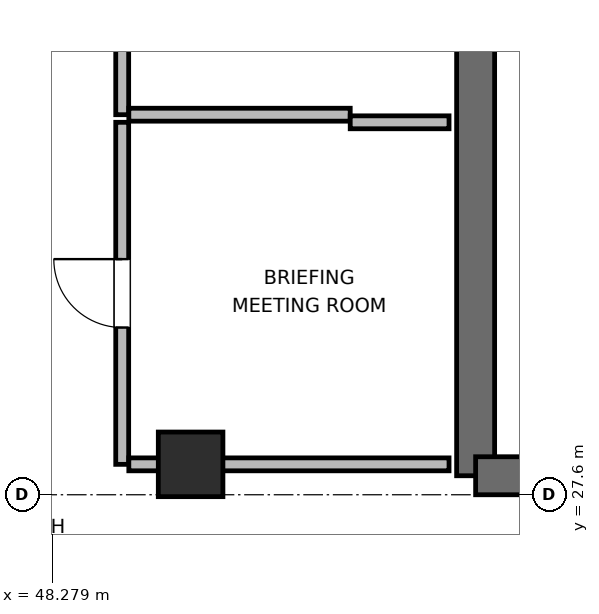
"""IFC4 building model, lengths in metres.
Left out: names, types, materials, properties, quantities, classifications, styles, units other than length and angle.
Written with IfcOpenShell. Run it as: python <this file> out.ifc"""

import sys

from ifc_helpers import new_model, si_unit, direction, frame, frame_2d, origin, origin_2d, place, context, subcontext, project, spatial, rectangle, extrude, element, fill, save


model = new_model("IFC4")
c1 = context("Model", 3, precision=1e-05, world=origin(), true_north=direction((0.0, 1.0)))
c2 = subcontext(c1, "Body", "Model", "MODEL_VIEW")
j1 = project(units=[si_unit("LENGTHUNIT", "METRE"), si_unit("PLANEANGLEUNIT", "RADIAN")], contexts=[c1])
p1 = place(None, origin())
s1 = spatial("IfcSite", under=j1, at=p1, CompositionType="ELEMENT")
p2 = place(p1, origin())
s2 = spatial("IfcBuilding", under=s1, at=p2, CompositionType="ELEMENT")
p3 = place(p2, frame((0.0, 0.0, 342.0)))
s3 = spatial("IfcBuildingStorey", under=s2, at=p3, CompositionType="ELEMENT", Elevation=342.0)
p4 = place(p3, frame((53.85, 27.85, 0.0), z_axis=(0.0, 0.0, 1.0), x_axis=(0.0, 1.0, 0.0)))
e1 = element("IfcWall", 1, at=p4, inside=s3, PredefinedType="SHEAR", context=c2, shape_type="SweptSolid", body=[
    extrude(rectangle(XDim=7.95, YDim=0.5, at=frame_2d((3.975, 0.0))), origin(), (0.0, 0.0, 1.0), 4.5),
])
p5 = place(p3, frame((53.85, 27.85, 0.0), z_axis=(0.0, 0.0, 1.0), x_axis=(1.0, 0.0, 0.0)))
e2 = element("IfcWall", 2, at=p5, inside=s3, PredefinedType="SHEAR", context=c2, shape_type="SweptSolid", body=[
    extrude(rectangle(XDim=9.5, YDim=0.5, at=frame_2d((4.75, 0.0))), origin(), (0.0, 0.0, 1.0), 4.5),
])
p6 = place(p5, frame((4.025, 0.0, 0.0)))
e3 = element("IfcOpeningElement", 3, at=p6, cuts=e2, PredefinedType="OPENING", context=c2, shape_type="SweptSolid", body=[
    extrude(rectangle(XDim=1.05, YDim=2.04, at=frame_2d((0.525, 1.02))), frame((0.0, 0.26, 0.0), z_axis=(0.0, -1.0, 0.0), x_axis=(1.0, 0.0, 0.0)), (0.0, 0.0, 1.0), 0.52),
])
p7 = place(p3, frame((50.1, 28.0, 0.0), z_axis=(0.0, 0.0, 1.0), x_axis=(1.0, 0.0, 0.0)))
e4 = element("IfcColumn", 4, at=p7, inside=s3, PredefinedType="COLUMN", context=c2, shape_type="SweptSolid", body=[
    extrude(rectangle(XDim=0.85, YDim=0.85, at=origin_2d()), origin(), (0.0, 0.0, 1.0), 4.5),
])
p8 = place(p3, frame((49.2, 32.6, 0.0), z_axis=(0.0, 0.0, 1.0), x_axis=(0.0, 1.0, 0.0)))
e5 = element("IfcWall", 5, at=p8, inside=s3, PredefinedType="PARTITIONING", context=c2, shape_type="SweptSolid", body=[
    extrude(rectangle(XDim=3.4, YDim=0.17, at=frame_2d((1.7, 0.0))), origin(), (0.0, 0.0, 1.0), 4.28),
])
p9 = place(p8, frame((1.25, 0.0, 0.0)))
e6 = element("IfcOpeningElement", 6, at=p9, cuts=e5, PredefinedType="OPENING", context=c2, shape_type="SweptSolid", body=[
    extrude(rectangle(XDim=0.9, YDim=2.02, at=frame_2d((0.45, 1.01))), frame((0.0, 0.095, 0.0), z_axis=(0.0, -1.0, 0.0), x_axis=(1.0, 0.0, 0.0)), (0.0, 0.0, 1.0), 0.19),
])
p10 = place(p3, frame((49.287, 32.6, 0.0), z_axis=(0.0, 0.0, 1.0), x_axis=(1.0, 0.0, 0.0)))
e7 = element("IfcWall", 7, at=p10, inside=s3, PredefinedType="PARTITIONING", context=c2, shape_type="SweptSolid", body=[
    extrude(rectangle(XDim=2.913, YDim=0.17, at=frame_2d((1.457, 0.0))), origin(), (0.0, 0.0, 1.0), 4.28),
])
p11 = place(p3, frame((49.2, 28.0, 0.0), z_axis=(0.0, 0.0, 1.0), x_axis=(0.0, 1.0, 0.0)))
e8 = element("IfcWall", 8, at=p11, inside=s3, PredefinedType="PARTITIONING", context=c2, shape_type="SweptSolid", body=[
    extrude(rectangle(XDim=4.5, YDim=0.17, at=frame_2d((2.25, 0.0))), origin(), (0.0, 0.0, 1.0), 4.28),
])
p12 = place(p11, frame((1.8, 0.0, 0.0)))
e9 = element("IfcOpeningElement", 9, at=p12, cuts=e8, PredefinedType="OPENING", context=c2, shape_type="SweptSolid", body=[
    extrude(rectangle(XDim=0.9, YDim=2.02, at=frame_2d((0.45, 1.01))), frame((0.0, 0.095, 0.0), z_axis=(0.0, -1.0, 0.0), x_axis=(1.0, 0.0, 0.0)), (0.0, 0.0, 1.0), 0.19),
])
p13 = place(p3, frame((49.287, 28.0, 0.0), z_axis=(0.0, 0.0, 1.0), x_axis=(1.0, 0.0, 0.0)))
e10 = element("IfcWall", 10, at=p13, inside=s3, PredefinedType="PARTITIONING", context=c2, shape_type="SweptSolid", body=[
    extrude(rectangle(XDim=4.213, YDim=0.17, at=frame_2d((2.106, 0.0))), origin(), (0.0, 0.0, 1.0), 3.365),
])
p14 = place(p3, frame((52.2, 32.5, 0.0), z_axis=(0.0, 0.0, 1.0), x_axis=(1.0, 0.0, 0.0)))
e11 = element("IfcWall", 11, at=p14, inside=s3, PredefinedType="PARTITIONING", context=c2, shape_type="SweptSolid", body=[
    extrude(rectangle(XDim=1.3, YDim=0.17, at=frame_2d((0.65, 0.0))), origin(), (0.0, 0.0, 1.0), 4.28),
])
p15 = place(p12, origin())
e12 = element("IfcDoor", 12, at=p15, inside=s3, OperationType="SINGLE_SWING_RIGHT", PredefinedType="DOOR", context=c2, shape_type="SweptSolid", body=[
    extrude(rectangle(XDim=0.9, YDim=2.02, at=frame_2d((0.45, 1.01))), frame((0.0, 0.025, 0.0), z_axis=(0.0, -1.0, 0.0), x_axis=(1.0, 0.0, 0.0)), (0.0, 0.0, 1.0), 0.05),
])
fill(e9, e12)
save(model, sys.argv[1])
